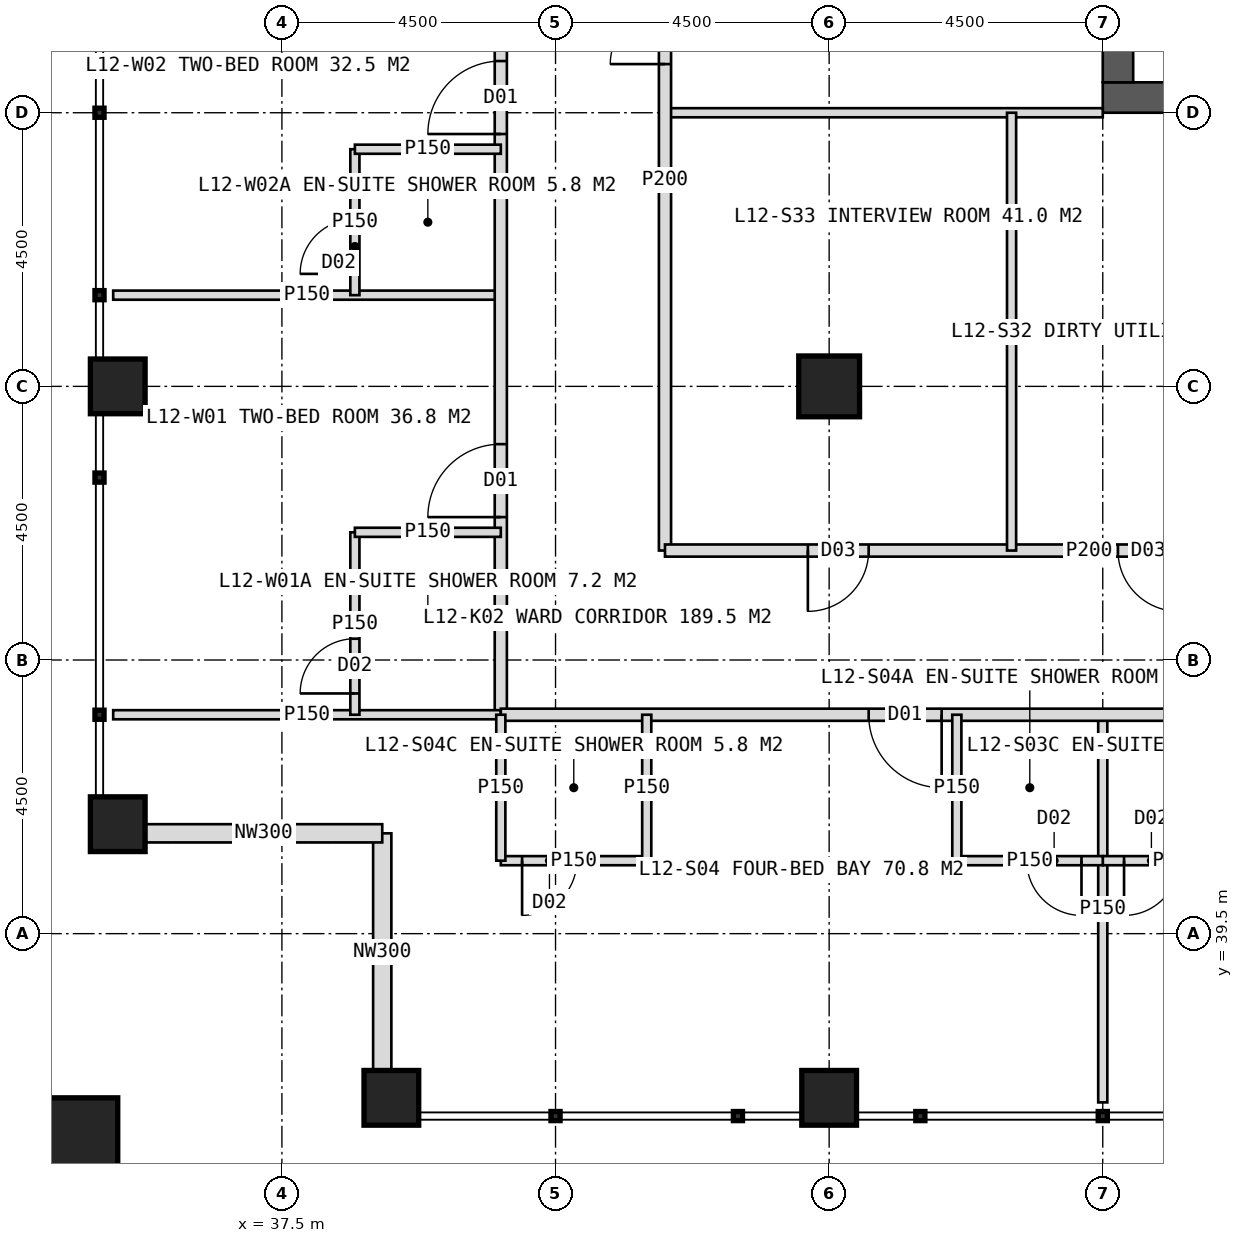
"""IFC4 building model, lengths in metres.
Left out: names, types, materials, properties, quantities, classifications, styles, units other than length and angle.
Written with IfcOpenShell. Run it as: python <this file> out.ifc"""

import sys

from ifc_helpers import new_model, si_unit, direction, frame, frame_2d, origin, origin_2d, place, context, subcontext, project, spatial, rectangle, hollow_rectangle, extrude, element, fill, save


model = new_model("IFC4")
c1 = context("Model", 3, precision=1e-05, world=origin(), true_north=direction((0.0, 1.0)))
c2 = subcontext(c1, "Body", "Model", "MODEL_VIEW")
j1 = project(units=[si_unit("LENGTHUNIT", "METRE"), si_unit("PLANEANGLEUNIT", "RADIAN")], contexts=[c1])
p1 = place(None, origin())
s1 = spatial("IfcSite", under=j1, at=p1, CompositionType="ELEMENT")
p2 = place(p1, origin())
s2 = spatial("IfcBuilding", under=s1, at=p2, CompositionType="ELEMENT")
p3 = place(p2, frame((0.0, 0.0, 55.0)))
s3 = spatial("IfcBuildingStorey", under=s2, at=p3, CompositionType="ELEMENT", Elevation=55.0)
p4 = place(p3, frame((51.0, 53.25, 0.0), z_axis=(0.0, 0.0, 1.0), x_axis=(1.0, 0.0, 0.0)))
e1 = element("IfcWall", 1, at=p4, inside=s3, PredefinedType="SHEAR", context=c2, shape_type="SweptSolid", body=[
    extrude(rectangle(XDim=18.0, YDim=0.5, at=frame_2d((9.0, 0.0))), origin(), (0.0, 0.0, 1.0), 4.0),
])
p5 = place(p4, frame((8.1, 0.0, 0.0)))
e2 = element("IfcOpeningElement", 2, at=p5, cuts=e1, PredefinedType="OPENING", context=c2, shape_type="SweptSolid", body=[
    extrude(rectangle(XDim=1.8, YDim=2.2, at=frame_2d((0.9, 1.1))), frame((0.0, 0.26, 0.0), z_axis=(0.0, -1.0, 0.0), x_axis=(1.0, 0.0, 0.0)), (0.0, 0.0, 1.0), 0.52),
])
p6 = place(p3, frame((51.25, 53.5, 0.0), z_axis=(0.0, 0.0, 1.0), x_axis=(0.0, 1.0, 0.0)))
e3 = element("IfcWall", 3, at=p6, inside=s3, PredefinedType="SHEAR", context=c2, shape_type="SweptSolid", body=[
    extrude(rectangle(XDim=17.0, YDim=0.5, at=frame_2d((8.5, 0.0))), origin(), (0.0, 0.0, 1.0), 4.0),
])
p7 = place(p6, frame((6.0, 0.0, 0.0)))
e4 = element("IfcOpeningElement", 4, at=p7, cuts=e3, PredefinedType="OPENING", context=c2, shape_type="SweptSolid", body=[
    extrude(rectangle(XDim=1.5, YDim=2.2, at=frame_2d((0.75, 1.1))), frame((0.0, 0.26, 0.0), z_axis=(0.0, -1.0, 0.0), x_axis=(1.0, 0.0, 0.0)), (0.0, 0.0, 1.0), 0.52),
])
p8 = place(p3, frame((46.5, 48.5, 0.0), z_axis=(0.0, 0.0, 1.0), x_axis=(1.0, 0.0, 0.0)))
e5 = element("IfcColumn", 5, at=p8, inside=s3, PredefinedType="COLUMN", context=c2, shape_type="SweptSolid", body=[
    extrude(hollow_rectangle(XDim=1.0, YDim=1.0, WallThickness=0.1, at=origin_2d()), origin(), (0.0, 0.0, 1.0), 4.0),
])
for number, where, z_axis, x_axis in (
    (6, (39.3, 36.8, 0.0), (0.0, 0.0, 1.0), (1.0, 0.0, 0.0)),
    (7, (34.8, 41.3, 0.0), (0.0, 0.0, 1.0), (1.0, 0.0, 0.0)),
    (8, (46.5, 36.8, 0.0), (0.0, 0.0, 1.0), (1.0, 0.0, 0.0)),
    (9, (34.8, 48.5, 0.0), (0.0, 0.0, 1.0), (1.0, 0.0, 0.0)),
):
    element("IfcColumn", number, at=place(p3, frame(where, z_axis=z_axis, x_axis=x_axis)), inside=s3, PredefinedType="COLUMN", context=c2, shape_type="SweptSolid", body=[
        extrude(hollow_rectangle(XDim=0.9, YDim=0.9, WallThickness=0.08, at=origin_2d()), origin(), (0.0, 0.0, 1.0), 4.0),
    ])
p9 = place(p3, frame((33.9, 35.9, 0.0), z_axis=(0.0, 0.0, 1.0), x_axis=(1.0, 0.0, 0.0)))
e10 = element("IfcColumn", 10, at=p9, inside=s3, PredefinedType="COLUMN", context=c2, shape_type="SweptSolid", body=[
    extrude(hollow_rectangle(XDim=1.8, YDim=1.8, WallThickness=0.1, at=origin_2d()), origin(), (0.0, 0.0, 1.0), 4.0),
])
for number, where, z_axis, x_axis in (
    (11, (39.15, 37.25, 0.0), (0.0, 0.0, 1.0), (0.0, 1.0, 0.0)),
    (12, (39.15, 41.15, 0.0), (0.0, 0.0, 1.0), (-1.0, 0.0, 0.0)),
):
    element("IfcWall", number, at=place(p3, frame(where, z_axis=z_axis, x_axis=x_axis)), inside=s3, PredefinedType="ELEMENTEDWALL", context=c2, shape_type="SweptSolid", body=[
        extrude(rectangle(XDim=3.9, YDim=0.3, at=frame_2d((1.95, 0.0))), origin(), (0.0, 0.0, 1.0), 2.95),
    ])
p10 = place(p3, frame((41.1, 50.0, 0.0), z_axis=(0.0, 0.0, 1.0), x_axis=(-1.0, 0.0, 0.0)))
e13 = element("IfcWall", 13, at=p10, inside=s3, PredefinedType="PARTITIONING", context=c2, shape_type="SweptSolid", body=[
    extrude(rectangle(XDim=6.375, YDim=0.15, at=frame_2d((3.188, 0.0))), origin(), (0.0, 0.0, 1.0), 3.75),
])
p11 = place(p3, frame((41.1, 43.1, 0.0), z_axis=(0.0, 0.0, 1.0), x_axis=(0.0, 1.0, 0.0)))
e14 = element("IfcWall", 14, at=p11, inside=s3, PredefinedType="PARTITIONING", context=c2, shape_type="SweptSolid", body=[
    extrude(rectangle(XDim=37.8, YDim=0.2, at=frame_2d((18.9, 0.0))), origin(), (0.0, 0.0, 1.0), 3.75),
])
p12 = place(p11, frame((3.25, 0.0, 0.0)))
e15 = element("IfcOpeningElement", 15, at=p12, cuts=e14, PredefinedType="OPENING", context=c2, shape_type="SweptSolid", body=[
    extrude(rectangle(XDim=1.2, YDim=2.2, at=frame_2d((0.6, 1.1))), frame((0.0, 0.11, 0.0), z_axis=(0.0, -1.0, 0.0), x_axis=(1.0, 0.0, 0.0)), (0.0, 0.0, 1.0), 0.22),
])
p13 = place(p11, frame((9.55, 0.0, 0.0)))
e16 = element("IfcOpeningElement", 16, at=p13, cuts=e14, PredefinedType="OPENING", context=c2, shape_type="SweptSolid", body=[
    extrude(rectangle(XDim=1.2, YDim=2.2, at=frame_2d((0.6, 1.1))), frame((0.0, 0.11, 0.0), z_axis=(0.0, -1.0, 0.0), x_axis=(1.0, 0.0, 0.0)), (0.0, 0.0, 1.0), 0.22),
])
p14 = place(p11, frame((15.55, 0.0, 0.0)))
e17 = element("IfcOpeningElement", 17, at=p14, cuts=e14, PredefinedType="OPENING", context=c2, shape_type="SweptSolid", body=[
    extrude(rectangle(XDim=1.2, YDim=2.2, at=frame_2d((0.6, 1.1))), frame((0.0, 0.11, 0.0), z_axis=(0.0, -1.0, 0.0), x_axis=(1.0, 0.0, 0.0)), (0.0, 0.0, 1.0), 0.22),
])
p15 = place(p11, frame((21.55, 0.0, 0.0)))
e18 = element("IfcOpeningElement", 18, at=p15, cuts=e14, PredefinedType="OPENING", context=c2, shape_type="SweptSolid", body=[
    extrude(rectangle(XDim=1.2, YDim=2.2, at=frame_2d((0.6, 1.1))), frame((0.0, 0.11, 0.0), z_axis=(0.0, -1.0, 0.0), x_axis=(1.0, 0.0, 0.0)), (0.0, 0.0, 1.0), 0.22),
])
p16 = place(p11, frame((27.55, 0.0, 0.0)))
e19 = element("IfcOpeningElement", 19, at=p16, cuts=e14, PredefinedType="OPENING", context=c2, shape_type="SweptSolid", body=[
    extrude(rectangle(XDim=1.2, YDim=2.2, at=frame_2d((0.6, 1.1))), frame((0.0, 0.11, 0.0), z_axis=(0.0, -1.0, 0.0), x_axis=(1.0, 0.0, 0.0)), (0.0, 0.0, 1.0), 0.22),
])
p17 = place(p3, frame((41.1, 43.1, 0.0), z_axis=(0.0, 0.0, 1.0), x_axis=(-1.0, 0.0, 0.0)))
e20 = element("IfcWall", 20, at=p17, inside=s3, PredefinedType="PARTITIONING", context=c2, shape_type="SweptSolid", body=[
    extrude(rectangle(XDim=6.375, YDim=0.15, at=frame_2d((3.188, 0.0))), origin(), (0.0, 0.0, 1.0), 3.75),
])
p18 = place(p3, frame((38.7, 43.1, 0.0), z_axis=(0.0, 0.0, 1.0), x_axis=(0.0, 1.0, 0.0)))
e21 = element("IfcWall", 21, at=p18, inside=s3, PredefinedType="PARTITIONING", context=c2, shape_type="SweptSolid", body=[
    extrude(rectangle(XDim=3.0, YDim=0.15, at=frame_2d((1.5, 0.0))), origin(), (0.0, 0.0, 1.0), 3.75),
])
p19 = place(p18, frame((0.35, 0.0, 0.0)))
e22 = element("IfcOpeningElement", 22, at=p19, cuts=e21, PredefinedType="OPENING", context=c2, shape_type="SweptSolid", body=[
    extrude(rectangle(XDim=0.9, YDim=2.1, at=frame_2d((0.45, 1.05))), frame((0.0, 0.085, 0.0), z_axis=(0.0, -1.0, 0.0), x_axis=(1.0, 0.0, 0.0)), (0.0, 0.0, 1.0), 0.17),
])
p20 = place(p3, frame((41.1, 46.1, 0.0), z_axis=(0.0, 0.0, 1.0), x_axis=(-1.0, 0.0, 0.0)))
e23 = element("IfcWall", 23, at=p20, inside=s3, PredefinedType="PARTITIONING", context=c2, shape_type="SweptSolid", body=[
    extrude(rectangle(XDim=2.4, YDim=0.15, at=frame_2d((1.2, 0.0))), origin(), (0.0, 0.0, 1.0), 3.75),
])
p21 = place(p3, frame((38.7, 50.0, 0.0), z_axis=(0.0, 0.0, 1.0), x_axis=(0.0, 1.0, 0.0)))
e24 = element("IfcWall", 24, at=p21, inside=s3, PredefinedType="PARTITIONING", context=c2, shape_type="SweptSolid", body=[
    extrude(rectangle(XDim=2.4, YDim=0.15, at=frame_2d((1.2, 0.0))), origin(), (0.0, 0.0, 1.0), 3.75),
])
p22 = place(p21, frame((0.35, 0.0, 0.0)))
e25 = element("IfcOpeningElement", 25, at=p22, cuts=e24, PredefinedType="OPENING", context=c2, shape_type="SweptSolid", body=[
    extrude(rectangle(XDim=0.9, YDim=2.1, at=frame_2d((0.45, 1.05))), frame((0.0, 0.085, 0.0), z_axis=(0.0, -1.0, 0.0), x_axis=(1.0, 0.0, 0.0)), (0.0, 0.0, 1.0), 0.17),
])
p23 = place(p3, frame((41.1, 52.4, 0.0), z_axis=(0.0, 0.0, 1.0), x_axis=(-1.0, 0.0, 0.0)))
e26 = element("IfcWall", 26, at=p23, inside=s3, PredefinedType="PARTITIONING", context=c2, shape_type="SweptSolid", body=[
    extrude(rectangle(XDim=2.4, YDim=0.15, at=frame_2d((1.2, 0.0))), origin(), (0.0, 0.0, 1.0), 3.75),
])
p24 = place(p3, frame((51.0, 53.0, 0.0), z_axis=(0.0, 0.0, 1.0), x_axis=(-1.0, 0.0, 0.0)))
e27 = element("IfcWall", 27, at=p24, inside=s3, PredefinedType="PARTITIONING", context=c2, shape_type="SweptSolid", body=[
    extrude(rectangle(XDim=7.2, YDim=0.15, at=frame_2d((3.6, 0.0))), origin(), (0.0, 0.0, 1.0), 3.75),
])
p25 = place(p3, frame((43.8, 45.8, 0.0), z_axis=(0.0, 0.0, 1.0), x_axis=(0.0, 1.0, 0.0)))
e28 = element("IfcWall", 28, at=p25, inside=s3, PredefinedType="PARTITIONING", context=c2, shape_type="SweptSolid", body=[
    extrude(rectangle(XDim=12.2, YDim=0.2, at=frame_2d((6.1, 0.0))), origin(), (0.0, 0.0, 1.0), 3.75),
])
p26 = place(p25, frame((8.0, 0.0, 0.0)))
e29 = element("IfcOpeningElement", 29, at=p26, cuts=e28, PredefinedType="OPENING", context=c2, shape_type="SweptSolid", body=[
    extrude(rectangle(XDim=0.9, YDim=2.1, at=frame_2d((0.45, 1.05))), frame((0.0, 0.11, 0.0), z_axis=(0.0, -1.0, 0.0), x_axis=(1.0, 0.0, 0.0)), (0.0, 0.0, 1.0), 0.22),
])
p27 = place(p25, frame((10.5, 0.0, 0.0)))
e30 = element("IfcOpeningElement", 30, at=p27, cuts=e28, PredefinedType="OPENING", context=c2, shape_type="SweptSolid", body=[
    extrude(rectangle(XDim=0.9, YDim=2.1, at=frame_2d((0.45, 1.05))), frame((0.0, 0.11, 0.0), z_axis=(0.0, -1.0, 0.0), x_axis=(1.0, 0.0, 0.0)), (0.0, 0.0, 1.0), 0.22),
])
p28 = place(p3, frame((51.0, 43.1, 0.0), z_axis=(0.0, 0.0, 1.0), x_axis=(0.0, -1.0, 0.0)))
e31 = element("IfcWall", 31, at=p28, inside=s3, PredefinedType="PARTITIONING", context=c2, shape_type="SweptSolid", body=[
    extrude(rectangle(XDim=6.375, YDim=0.15, at=frame_2d((3.188, 0.0))), origin(), (0.0, 0.0, 1.0), 3.75),
])
p29 = place(p3, frame((78.9, 43.1, 0.0), z_axis=(0.0, 0.0, 1.0), x_axis=(-1.0, 0.0, 0.0)))
e32 = element("IfcWall", 32, at=p29, inside=s3, PredefinedType="PARTITIONING", context=c2, shape_type="SweptSolid", body=[
    extrude(rectangle(XDim=37.8, YDim=0.2, at=frame_2d((18.9, 0.0))), origin(), (0.0, 0.0, 1.0), 3.75),
])
p30 = place(p29, frame((2.65, 0.0, 0.0)))
e33 = element("IfcOpeningElement", 33, at=p30, cuts=e32, PredefinedType="OPENING", context=c2, shape_type="SweptSolid", body=[
    extrude(rectangle(XDim=1.2, YDim=2.2, at=frame_2d((0.6, 1.1))), frame((0.0, 0.11, 0.0), z_axis=(0.0, -1.0, 0.0), x_axis=(1.0, 0.0, 0.0)), (0.0, 0.0, 1.0), 0.22),
])
p31 = place(p29, frame((12.55, 0.0, 0.0)))
e34 = element("IfcOpeningElement", 34, at=p31, cuts=e32, PredefinedType="OPENING", context=c2, shape_type="SweptSolid", body=[
    extrude(rectangle(XDim=1.2, YDim=2.2, at=frame_2d((0.6, 1.1))), frame((0.0, 0.11, 0.0), z_axis=(0.0, -1.0, 0.0), x_axis=(1.0, 0.0, 0.0)), (0.0, 0.0, 1.0), 0.22),
])
p32 = place(p29, frame((21.55, 0.0, 0.0)))
e35 = element("IfcOpeningElement", 35, at=p32, cuts=e32, PredefinedType="OPENING", context=c2, shape_type="SweptSolid", body=[
    extrude(rectangle(XDim=1.2, YDim=2.2, at=frame_2d((0.6, 1.1))), frame((0.0, 0.11, 0.0), z_axis=(0.0, -1.0, 0.0), x_axis=(1.0, 0.0, 0.0)), (0.0, 0.0, 1.0), 0.22),
])
p33 = place(p29, frame((30.55, 0.0, 0.0)))
e36 = element("IfcOpeningElement", 36, at=p33, cuts=e32, PredefinedType="OPENING", context=c2, shape_type="SweptSolid", body=[
    extrude(rectangle(XDim=1.2, YDim=2.2, at=frame_2d((0.6, 1.1))), frame((0.0, 0.11, 0.0), z_axis=(0.0, -1.0, 0.0), x_axis=(1.0, 0.0, 0.0)), (0.0, 0.0, 1.0), 0.22),
])
p34 = place(p3, frame((53.4, 40.7, 0.0), z_axis=(0.0, 0.0, 1.0), x_axis=(-1.0, 0.0, 0.0)))
e37 = element("IfcWall", 37, at=p34, inside=s3, PredefinedType="PARTITIONING", context=c2, shape_type="SweptSolid", body=[
    extrude(rectangle(XDim=2.4, YDim=0.15, at=frame_2d((1.2, 0.0))), origin(), (0.0, 0.0, 1.0), 3.75),
])
p35 = place(p34, frame((1.15, 0.0, 0.0)))
e38 = element("IfcOpeningElement", 38, at=p35, cuts=e37, PredefinedType="OPENING", context=c2, shape_type="SweptSolid", body=[
    extrude(rectangle(XDim=0.9, YDim=2.1, at=frame_2d((0.45, 1.05))), frame((0.0, 0.085, 0.0), z_axis=(0.0, -1.0, 0.0), x_axis=(1.0, 0.0, 0.0)), (0.0, 0.0, 1.0), 0.17),
])
p36 = place(p3, frame((51.0, 40.7, 0.0), z_axis=(0.0, 0.0, 1.0), x_axis=(-1.0, 0.0, 0.0)))
e39 = element("IfcWall", 39, at=p36, inside=s3, PredefinedType="PARTITIONING", context=c2, shape_type="SweptSolid", body=[
    extrude(rectangle(XDim=2.4, YDim=0.15, at=frame_2d((1.2, 0.0))), origin(), (0.0, 0.0, 1.0), 3.75),
])
p37 = place(p36, frame((0.35, 0.0, 0.0)))
e40 = element("IfcOpeningElement", 40, at=p37, cuts=e39, PredefinedType="OPENING", context=c2, shape_type="SweptSolid", body=[
    extrude(rectangle(XDim=0.9, YDim=2.1, at=frame_2d((0.45, 1.05))), frame((0.0, 0.085, 0.0), z_axis=(0.0, -1.0, 0.0), x_axis=(1.0, 0.0, 0.0)), (0.0, 0.0, 1.0), 0.17),
])
p38 = place(p3, frame((48.6, 43.1, 0.0), z_axis=(0.0, 0.0, 1.0), x_axis=(0.0, -1.0, 0.0)))
e41 = element("IfcWall", 41, at=p38, inside=s3, PredefinedType="PARTITIONING", context=c2, shape_type="SweptSolid", body=[
    extrude(rectangle(XDim=2.4, YDim=0.15, at=frame_2d((1.2, 0.0))), origin(), (0.0, 0.0, 1.0), 3.75),
])
p39 = place(p3, frame((43.5, 40.7, 0.0), z_axis=(0.0, 0.0, 1.0), x_axis=(-1.0, 0.0, 0.0)))
e42 = element("IfcWall", 42, at=p39, inside=s3, PredefinedType="PARTITIONING", context=c2, shape_type="SweptSolid", body=[
    extrude(rectangle(XDim=2.4, YDim=0.15, at=frame_2d((1.2, 0.0))), origin(), (0.0, 0.0, 1.0), 3.75),
])
p40 = place(p39, frame((1.15, 0.0, 0.0)))
e43 = element("IfcOpeningElement", 43, at=p40, cuts=e42, PredefinedType="OPENING", context=c2, shape_type="SweptSolid", body=[
    extrude(rectangle(XDim=0.9, YDim=2.1, at=frame_2d((0.45, 1.05))), frame((0.0, 0.085, 0.0), z_axis=(0.0, -1.0, 0.0), x_axis=(1.0, 0.0, 0.0)), (0.0, 0.0, 1.0), 0.17),
])
for number, where, z_axis, x_axis in (
    (44, (43.5, 43.1, 0.0), (0.0, 0.0, 1.0), (0.0, -1.0, 0.0)),
    (45, (41.1, 43.1, 0.0), (0.0, 0.0, 1.0), (0.0, -1.0, 0.0)),
):
    element("IfcWall", number, at=place(p3, frame(where, z_axis=z_axis, x_axis=x_axis)), inside=s3, PredefinedType="PARTITIONING", context=c2, shape_type="SweptSolid", body=[
        extrude(rectangle(XDim=2.4, YDim=0.15, at=frame_2d((1.2, 0.0))), origin(), (0.0, 0.0, 1.0), 3.75),
    ])
p41 = place(p3, frame((57.75, 45.8, 0.0), z_axis=(0.0, 0.0, 1.0), x_axis=(-1.0, 0.0, 0.0)))
e46 = element("IfcWall", 46, at=p41, inside=s3, PredefinedType="PARTITIONING", context=c2, shape_type="SweptSolid", body=[
    extrude(rectangle(XDim=13.95, YDim=0.2, at=frame_2d((6.975, 0.0))), origin(), (0.0, 0.0, 1.0), 3.75),
])
p42 = place(p41, frame((1.375, 0.0, 0.0)))
e47 = element("IfcOpeningElement", 47, at=p42, cuts=e46, PredefinedType="OPENING", context=c2, shape_type="SweptSolid", body=[
    extrude(rectangle(XDim=1.0, YDim=2.1, at=frame_2d((0.5, 1.05))), frame((0.0, 0.11, 0.0), z_axis=(0.0, -1.0, 0.0), x_axis=(1.0, 0.0, 0.0)), (0.0, 0.0, 1.0), 0.22),
])
p43 = place(p41, frame((5.5, 0.0, 0.0)))
e48 = element("IfcOpeningElement", 48, at=p43, cuts=e46, PredefinedType="OPENING", context=c2, shape_type="SweptSolid", body=[
    extrude(rectangle(XDim=1.0, YDim=2.1, at=frame_2d((0.5, 1.05))), frame((0.0, 0.11, 0.0), z_axis=(0.0, -1.0, 0.0), x_axis=(1.0, 0.0, 0.0)), (0.0, 0.0, 1.0), 0.22),
])
p44 = place(p41, frame((10.6, 0.0, 0.0)))
e49 = element("IfcOpeningElement", 49, at=p44, cuts=e46, PredefinedType="OPENING", context=c2, shape_type="SweptSolid", body=[
    extrude(rectangle(XDim=1.0, YDim=2.1, at=frame_2d((0.5, 1.05))), frame((0.0, 0.11, 0.0), z_axis=(0.0, -1.0, 0.0), x_axis=(1.0, 0.0, 0.0)), (0.0, 0.0, 1.0), 0.22),
])
p45 = place(p3, frame((49.5, 53.0, 0.0), z_axis=(0.0, 0.0, 1.0), x_axis=(0.0, -1.0, 0.0)))
e50 = element("IfcWall", 50, at=p45, inside=s3, PredefinedType="PARTITIONING", context=c2, shape_type="SweptSolid", body=[
    extrude(rectangle(XDim=7.2, YDim=0.15, at=frame_2d((3.6, 0.0))), origin(), (0.0, 0.0, 1.0), 3.75),
])
p46 = place(p12, origin())
e51 = element("IfcDoor", 51, at=p46, inside=s3, OperationType="SINGLE_SWING_LEFT", PredefinedType="DOOR", context=c2, shape_type="SweptSolid", body=[
    extrude(rectangle(XDim=1.2, YDim=2.2, at=frame_2d((0.6, 1.1))), frame((0.0, 0.025, 0.0), z_axis=(0.0, -1.0, 0.0), x_axis=(1.0, 0.0, 0.0)), (0.0, 0.0, 1.0), 0.05),
])
fill(e15, e51)
p47 = place(p19, origin())
e52 = element("IfcDoor", 52, at=p47, inside=s3, OperationType="SINGLE_SWING_LEFT", PredefinedType="DOOR", context=c2, shape_type="SweptSolid", body=[
    extrude(rectangle(XDim=0.9, YDim=2.1, at=frame_2d((0.45, 1.05))), frame((0.0, 0.025, 0.0), z_axis=(0.0, -1.0, 0.0), x_axis=(1.0, 0.0, 0.0)), (0.0, 0.0, 1.0), 0.05),
])
fill(e22, e52)
p48 = place(p13, origin())
e53 = element("IfcDoor", 53, at=p48, inside=s3, OperationType="SINGLE_SWING_LEFT", PredefinedType="DOOR", context=c2, shape_type="SweptSolid", body=[
    extrude(rectangle(XDim=1.2, YDim=2.2, at=frame_2d((0.6, 1.1))), frame((0.0, 0.025, 0.0), z_axis=(0.0, -1.0, 0.0), x_axis=(1.0, 0.0, 0.0)), (0.0, 0.0, 1.0), 0.05),
])
fill(e16, e53)
p49 = place(p22, origin())
e54 = element("IfcDoor", 54, at=p49, inside=s3, OperationType="SINGLE_SWING_LEFT", PredefinedType="DOOR", context=c2, shape_type="SweptSolid", body=[
    extrude(rectangle(XDim=0.9, YDim=2.1, at=frame_2d((0.45, 1.05))), frame((0.0, 0.025, 0.0), z_axis=(0.0, -1.0, 0.0), x_axis=(1.0, 0.0, 0.0)), (0.0, 0.0, 1.0), 0.05),
])
fill(e25, e54)
p50 = place(p26, origin())
e55 = element("IfcDoor", 55, at=p50, inside=s3, OperationType="SINGLE_SWING_LEFT", PredefinedType="DOOR", context=c2, shape_type="SweptSolid", body=[
    extrude(rectangle(XDim=0.9, YDim=2.1, at=frame_2d((0.45, 1.05))), frame((0.0, 0.025, 0.0), z_axis=(0.0, -1.0, 0.0), x_axis=(1.0, 0.0, 0.0)), (0.0, 0.0, 1.0), 0.05),
])
fill(e29, e55)
p51 = place(p35, origin())
e56 = element("IfcDoor", 56, at=p51, inside=s3, OperationType="SINGLE_SWING_RIGHT", PredefinedType="DOOR", context=c2, shape_type="SweptSolid", body=[
    extrude(rectangle(XDim=0.9, YDim=2.1, at=frame_2d((0.45, 1.05))), frame((0.0, 0.025, 0.0), z_axis=(0.0, -1.0, 0.0), x_axis=(1.0, 0.0, 0.0)), (0.0, 0.0, 1.0), 0.05),
])
fill(e38, e56)
p52 = place(p33, origin())
e57 = element("IfcDoor", 57, at=p52, inside=s3, OperationType="SINGLE_SWING_LEFT", PredefinedType="DOOR", context=c2, shape_type="SweptSolid", body=[
    extrude(rectangle(XDim=1.2, YDim=2.2, at=frame_2d((0.6, 1.1))), frame((0.0, 0.025, 0.0), z_axis=(0.0, -1.0, 0.0), x_axis=(1.0, 0.0, 0.0)), (0.0, 0.0, 1.0), 0.05),
])
fill(e36, e57)
p53 = place(p37, origin())
e58 = element("IfcDoor", 58, at=p53, inside=s3, OperationType="SINGLE_SWING_LEFT", PredefinedType="DOOR", context=c2, shape_type="SweptSolid", body=[
    extrude(rectangle(XDim=0.9, YDim=2.1, at=frame_2d((0.45, 1.05))), frame((0.0, 0.025, 0.0), z_axis=(0.0, -1.0, 0.0), x_axis=(1.0, 0.0, 0.0)), (0.0, 0.0, 1.0), 0.05),
])
fill(e40, e58)
p54 = place(p40, origin())
e59 = element("IfcDoor", 59, at=p54, inside=s3, OperationType="SINGLE_SWING_RIGHT", PredefinedType="DOOR", context=c2, shape_type="SweptSolid", body=[
    extrude(rectangle(XDim=0.9, YDim=2.1, at=frame_2d((0.45, 1.05))), frame((0.0, 0.025, 0.0), z_axis=(0.0, -1.0, 0.0), x_axis=(1.0, 0.0, 0.0)), (0.0, 0.0, 1.0), 0.05),
])
fill(e43, e59)
p55 = place(p43, origin())
e60 = element("IfcDoor", 60, at=p55, inside=s3, OperationType="SINGLE_SWING_LEFT", PredefinedType="DOOR", context=c2, shape_type="SweptSolid", body=[
    extrude(rectangle(XDim=1.0, YDim=2.1, at=frame_2d((0.5, 1.05))), frame((0.0, 0.025, 0.0), z_axis=(0.0, -1.0, 0.0), x_axis=(1.0, 0.0, 0.0)), (0.0, 0.0, 1.0), 0.05),
])
fill(e48, e60)
p56 = place(p44, origin())
e61 = element("IfcDoor", 61, at=p56, inside=s3, OperationType="SINGLE_SWING_RIGHT", PredefinedType="DOOR", context=c2, shape_type="SweptSolid", body=[
    extrude(rectangle(XDim=1.0, YDim=2.1, at=frame_2d((0.5, 1.05))), frame((0.0, 0.025, 0.0), z_axis=(0.0, -1.0, 0.0), x_axis=(1.0, 0.0, 0.0)), (0.0, 0.0, 1.0), 0.05),
])
fill(e49, e61)
save(model, sys.argv[1])
